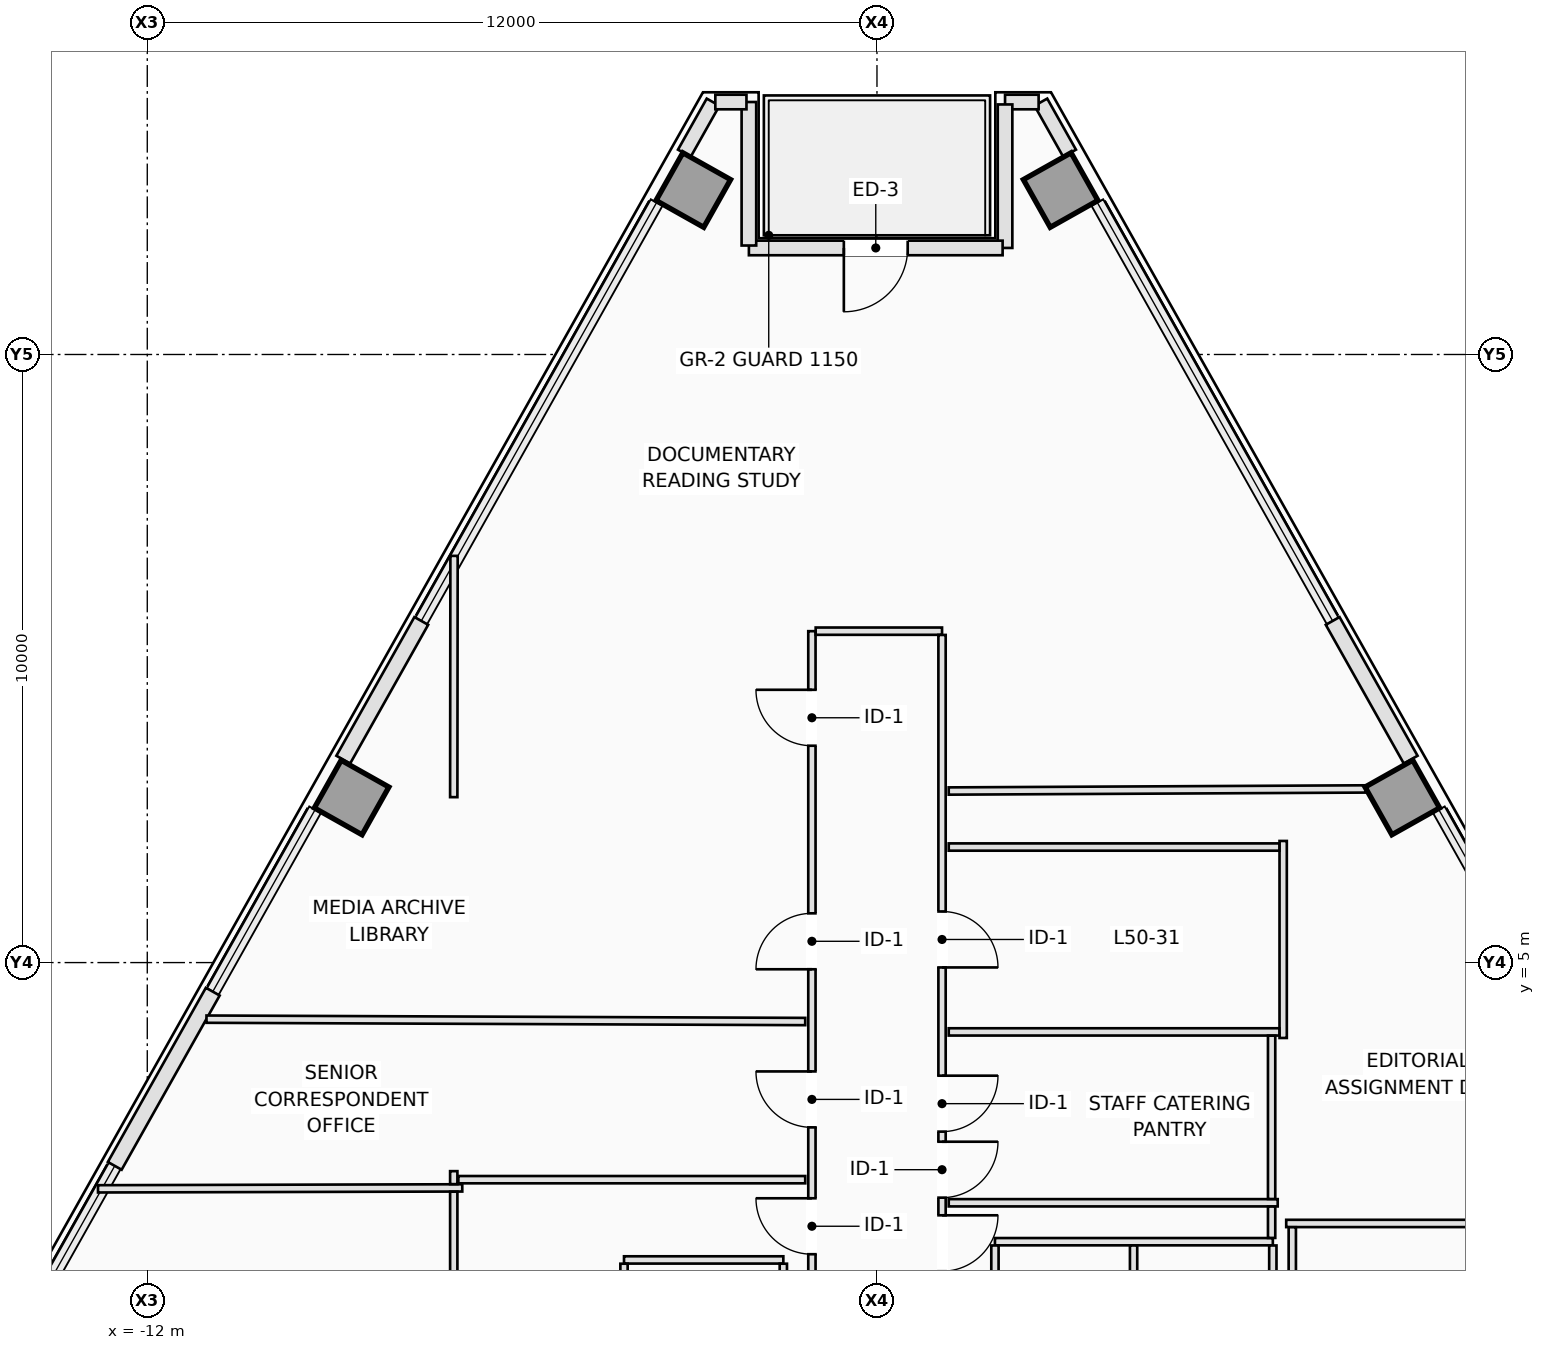
"""IFC4 building model, lengths in metres.
Left out: names, types, materials, properties, quantities, classifications, styles, units other than length and angle.
Written with IfcOpenShell. Run it as: python <this file> out.ifc"""

import sys

from ifc_helpers import new_model, si_unit, direction, frame, frame_2d, origin, origin_2d, place, context, subcontext, project, spatial, rectangle, extrude, element, fill, save


model = new_model("IFC4")
c1 = context("Model", 3, precision=1e-05, world=origin(), true_north=direction((0.0, 1.0)))
c2 = subcontext(c1, "Body", "Model", "MODEL_VIEW")
j1 = project(units=[si_unit("LENGTHUNIT", "METRE"), si_unit("PLANEANGLEUNIT", "RADIAN")], contexts=[c1])
p1 = place(None, origin())
s1 = spatial("IfcSite", under=j1, at=p1, CompositionType="ELEMENT")
p2 = place(p1, origin())
s2 = spatial("IfcBuilding", under=s1, at=p2, CompositionType="ELEMENT")
p3 = place(p2, frame((0.0, 0.0, 183.4)))
s3 = spatial("IfcBuildingStorey", under=s2, at=p3, CompositionType="ELEMENT", Elevation=183.4)
for number, where, z_axis, x_axis in (
    (1, (8.64, 7.715, 0.0), (0.0, 0.0, 1.0), (0.872, 0.49, 0.0)),
    (2, (3.021, 17.704, 0.0), (0.0, 0.0, 1.0), (0.872, 0.49, 0.0)),
    (3, (-3.021, 17.704, 0.0), (0.0, 0.0, 1.0), (-0.872, 0.49, 0.0)),
    (4, (-8.64, 7.715, 0.0), (0.0, 0.0, 1.0), (-0.872, 0.49, 0.0)),
):
    element("IfcColumn", number, at=place(p3, frame(where, z_axis=z_axis, x_axis=x_axis)), inside=s3, PredefinedType="COLUMN", context=c2, shape_type="SweptSolid", body=[
        extrude(rectangle(XDim=0.9, YDim=0.9, at=origin_2d()), origin(), (0.0, 0.0, 1.0), 3.5),
    ])
p4 = place(p3, frame((2.695, 19.149, 0.0), z_axis=(0.0, 0.0, 1.0), x_axis=(0.490345412687, -0.87152818443, 0.0)))
e5 = element("IfcWall", 5, at=p4, inside=s3, PredefinedType="STANDARD", context=c2, shape_type="SweptSolid", body=[
    extrude(rectangle(XDim=0.964, YDim=0.24, at=frame_2d((0.482, 0.0))), origin(), (0.0, 0.0, 1.0), 3.25),
])
p5 = place(p3, frame((7.494, 10.618, 0.0), z_axis=(0.0, 0.0, 1.0), x_axis=(0.490301099378, -0.871553114818, 0.0)))
e6 = element("IfcWall", 6, at=p5, inside=s3, PredefinedType="STANDARD", context=c2, shape_type="SweptSolid", body=[
    extrude(rectangle(XDim=2.617, YDim=0.26, at=frame_2d((1.309, 0.0))), origin(), (0.0, 0.0, 1.0), 3.25),
])
p6 = place(p3, frame((-3.168, 18.309, 0.0), z_axis=(0.0, 0.0, 1.0), x_axis=(0.490345412687, 0.87152818443, 0.0)))
e7 = element("IfcWall", 7, at=p6, inside=s3, PredefinedType="STANDARD", context=c2, shape_type="SweptSolid", body=[
    extrude(rectangle(XDim=0.964, YDim=0.24, at=frame_2d((0.482, 0.0))), origin(), (0.0, 0.0, 1.0), 3.25),
])
p7 = place(p3, frame((-8.777, 8.337, 0.0), z_axis=(0.0, 0.0, 1.0), x_axis=(0.490301099378, 0.871553114818, 0.0)))
e8 = element("IfcWall", 8, at=p7, inside=s3, PredefinedType="STANDARD", context=c2, shape_type="SweptSolid", body=[
    extrude(rectangle(XDim=2.617, YDim=0.26, at=frame_2d((1.309, 0.0))), origin(), (0.0, 0.0, 1.0), 3.25),
])
p8 = place(p3, frame((-12.535, 1.657, 0.0), z_axis=(0.0, 0.0, 1.0), x_axis=(0.490264765862, 0.871573553611, 0.0)))
e9 = element("IfcWall", 9, at=p8, inside=s3, PredefinedType="STANDARD", context=c2, shape_type="SweptSolid", body=[
    extrude(rectangle(XDim=3.287, YDim=0.26, at=frame_2d((1.644, 0.0))), origin(), (0.0, 0.0, 1.0), 3.25),
])
p9 = place(p3, frame((2.658, 19.152, 0.0), z_axis=(0.0, 0.0, 1.0), x_axis=(-1.0, 0.0, 0.0)))
e10 = element("IfcWall", 10, at=p9, inside=s3, PredefinedType="STANDARD", context=c2, shape_type="SweptSolid", body=[
    extrude(rectangle(XDim=0.552, YDim=0.24, at=frame_2d((0.276, 0.0))), origin(), (0.0, 0.0, 1.0), 3.25),
])
p10 = place(p3, frame((2.106, 19.112, 0.0), z_axis=(0.0, 0.0, 1.0), x_axis=(0.0, -1.0, 0.0)))
e11 = element("IfcWall", 11, at=p10, inside=s3, PredefinedType="STANDARD", context=c2, shape_type="SweptSolid", body=[
    extrude(rectangle(XDim=2.36, YDim=0.24, at=frame_2d((1.18, 0.0))), origin(), (0.0, 0.0, 1.0), 3.25),
])
p11 = place(p3, frame((2.066, 16.752, 0.0), z_axis=(0.0, 0.0, 1.0), x_axis=(-1.0, 0.0, 0.0)))
e12 = element("IfcWall", 12, at=p11, inside=s3, PredefinedType="STANDARD", context=c2, shape_type="SweptSolid", body=[
    extrude(rectangle(XDim=4.172, YDim=0.24, at=frame_2d((2.086, 0.0))), origin(), (0.0, 0.0, 1.0), 3.25),
])
p12 = place(p11, frame((1.561, 0.0, 0.0)))
e13 = element("IfcOpeningElement", 13, at=p12, cuts=e12, PredefinedType="OPENING", context=c2, shape_type="SweptSolid", body=[
    extrude(rectangle(XDim=1.05, YDim=2.2, at=frame_2d((0.525, 1.1))), frame((0.0, 0.13, 0.0), z_axis=(0.0, -1.0, 0.0), x_axis=(1.0, 0.0, 0.0)), (0.0, 0.0, 1.0), 0.26),
])
p13 = place(p3, frame((-2.106, 16.792, 0.0), z_axis=(0.0, 0.0, 1.0), x_axis=(0.0, 1.0, 0.0)))
e14 = element("IfcWall", 14, at=p13, inside=s3, PredefinedType="STANDARD", context=c2, shape_type="SweptSolid", body=[
    extrude(rectangle(XDim=2.36, YDim=0.24, at=frame_2d((1.18, 0.0))), origin(), (0.0, 0.0, 1.0), 3.25),
])
p14 = place(p3, frame((-2.146, 19.152, 0.0), z_axis=(0.0, 0.0, 1.0), x_axis=(-1.0, 0.0, 0.0)))
e15 = element("IfcWall", 15, at=p14, inside=s3, PredefinedType="STANDARD", context=c2, shape_type="SweptSolid", body=[
    extrude(rectangle(XDim=0.512, YDim=0.24, at=frame_2d((0.256, 0.0))), origin(), (0.0, 0.0, 1.0), 3.25),
])
p15 = place(p3, frame((-4.16, 0.11, 0.0), z_axis=(0.0, 0.0, 1.0), x_axis=(1.0, 0.0, 0.0)))
e16 = element("IfcWall", 16, at=p15, inside=s3, PredefinedType="PARTITIONING", context=c2, shape_type="SweptSolid", body=[
    extrude(rectangle(XDim=2.62, YDim=0.12, at=frame_2d((1.31, 0.0))), origin(), (0.0, 0.0, 1.0), 3.25),
])
for number, where, z_axis, x_axis in (
    (17, (-4.16, -2.378, 0.0), (0.0, 0.0, 1.0), (0.0, 1.0, 0.0)),
    (18, (-1.54, -2.378, 0.0), (0.0, 0.0, 1.0), (0.0, 1.0, 0.0)),
):
    element("IfcWall", number, at=place(p3, frame(where, z_axis=z_axis, x_axis=x_axis)), inside=s3, PredefinedType="PARTITIONING", context=c2, shape_type="SweptSolid", body=[
        extrude(rectangle(XDim=2.426, YDim=0.12, at=frame_2d((1.213, 0.0))), origin(), (0.0, 0.0, 1.0), 3.25),
    ])
p16 = place(p3, frame((1.94, 0.41, 0.0), z_axis=(0.0, 0.0, 1.0), x_axis=(1.0, 0.0, 0.0)))
e19 = element("IfcWall", 19, at=p16, inside=s3, PredefinedType="PARTITIONING", context=c2, shape_type="SweptSolid", body=[
    extrude(rectangle(XDim=4.57, YDim=0.12, at=frame_2d((2.285, 0.0))), origin(), (0.0, 0.0, 1.0), 3.25),
])
for number, where, z_axis, x_axis in (
    (20, (1.94, -2.378, 0.0), (0.0, 0.0, 1.0), (0.0, 1.0, 0.0)),
    (21, (4.22, -2.378, 0.0), (0.0, 0.0, 1.0), (0.0, 1.0, 0.0)),
    (22, (6.51, -2.378, 0.0), (0.0, 0.0, 1.0), (0.0, 1.0, 0.0)),
):
    element("IfcWall", number, at=place(p3, frame(where, z_axis=z_axis, x_axis=x_axis)), inside=s3, PredefinedType="PARTITIONING", context=c2, shape_type="SweptSolid", body=[
        extrude(rectangle(XDim=2.726, YDim=0.12, at=frame_2d((1.363, 0.0))), origin(), (0.0, 0.0, 1.0), 3.25),
    ])
p17 = place(p3, frame((-1.07, -2.338, 0.0), z_axis=(0.0, 0.0, 1.0), x_axis=(0.0, 1.0, 0.0)))
e23 = element("IfcWall", 23, at=p17, inside=s3, PredefinedType="PARTITIONING", context=c2, shape_type="SweptSolid", body=[
    extrude(rectangle(XDim=12.788, YDim=0.12, at=frame_2d((6.394, 0.0))), origin(), (0.0, 0.0, 1.0), 3.25),
])
p18 = place(p17, frame((10.904, 0.0, 0.0)))
e24 = element("IfcOpeningElement", 24, at=p18, cuts=e23, PredefinedType="OPENING", context=c2, shape_type="SweptSolid", body=[
    extrude(rectangle(XDim=0.92, YDim=2.12, at=frame_2d((0.46, 1.06))), frame((0.0, 0.07, 0.0), z_axis=(0.0, -1.0, 0.0), x_axis=(1.0, 0.0, 0.0)), (0.0, 0.0, 1.0), 0.14),
])
p19 = place(p17, frame((7.228, 0.0, 0.0)))
e25 = element("IfcOpeningElement", 25, at=p19, cuts=e23, PredefinedType="OPENING", context=c2, shape_type="SweptSolid", body=[
    extrude(rectangle(XDim=0.92, YDim=2.12, at=frame_2d((0.46, 1.06))), frame((0.0, 0.07, 0.0), z_axis=(0.0, -1.0, 0.0), x_axis=(1.0, 0.0, 0.0)), (0.0, 0.0, 1.0), 0.14),
])
p20 = place(p17, frame((4.628, 0.0, 0.0)))
e26 = element("IfcOpeningElement", 26, at=p20, cuts=e23, PredefinedType="OPENING", context=c2, shape_type="SweptSolid", body=[
    extrude(rectangle(XDim=0.92, YDim=2.12, at=frame_2d((0.46, 1.06))), frame((0.0, 0.07, 0.0), z_axis=(0.0, -1.0, 0.0), x_axis=(1.0, 0.0, 0.0)), (0.0, 0.0, 1.0), 0.14),
])
p21 = place(p17, frame((2.542, 0.0, 0.0)))
e27 = element("IfcOpeningElement", 27, at=p21, cuts=e23, PredefinedType="OPENING", context=c2, shape_type="SweptSolid", body=[
    extrude(rectangle(XDim=0.92, YDim=2.12, at=frame_2d((0.46, 1.06))), frame((0.0, 0.07, 0.0), z_axis=(0.0, -1.0, 0.0), x_axis=(1.0, 0.0, 0.0)), (0.0, 0.0, 1.0), 0.14),
])
p22 = place(p3, frame((-1.008, 10.45, 0.0), z_axis=(0.0, 0.0, 1.0), x_axis=(1.0, 0.0, 0.0)))
e28 = element("IfcWall", 28, at=p22, inside=s3, PredefinedType="PARTITIONING", context=c2, shape_type="SweptSolid", body=[
    extrude(rectangle(XDim=2.078, YDim=0.12, at=frame_2d((1.039, 0.0))), origin(), (0.0, 0.0, 1.0), 3.25),
])
p23 = place(p3, frame((1.07, 10.388, 0.0), z_axis=(0.0, 0.0, 1.0), x_axis=(0.0, -1.0, 0.0)))
e29 = element("IfcWall", 29, at=p23, inside=s3, PredefinedType="PARTITIONING", context=c2, shape_type="SweptSolid", body=[
    extrude(rectangle(XDim=12.788, YDim=0.12, at=frame_2d((6.394, 0.0))), origin(), (0.0, 0.0, 1.0), 3.25),
])
p24 = place(p23, frame((4.548, 0.0, 0.0)))
e30 = element("IfcOpeningElement", 30, at=p24, cuts=e29, PredefinedType="OPENING", context=c2, shape_type="SweptSolid", body=[
    extrude(rectangle(XDim=0.92, YDim=2.12, at=frame_2d((0.46, 1.06))), frame((0.0, 0.07, 0.0), z_axis=(0.0, -1.0, 0.0), x_axis=(1.0, 0.0, 0.0)), (0.0, 0.0, 1.0), 0.14),
])
p25 = place(p23, frame((8.334, 0.0, 0.0)))
e31 = element("IfcOpeningElement", 31, at=p25, cuts=e29, PredefinedType="OPENING", context=c2, shape_type="SweptSolid", body=[
    extrude(rectangle(XDim=0.92, YDim=2.12, at=frame_2d((0.46, 1.06))), frame((0.0, 0.07, 0.0), z_axis=(0.0, -1.0, 0.0), x_axis=(1.0, 0.0, 0.0)), (0.0, 0.0, 1.0), 0.14),
])
p26 = place(p23, frame((7.248, 0.0, 0.0)))
e32 = element("IfcOpeningElement", 32, at=p26, cuts=e29, PredefinedType="OPENING", context=c2, shape_type="SweptSolid", body=[
    extrude(rectangle(XDim=0.92, YDim=2.12, at=frame_2d((0.46, 1.06))), frame((0.0, 0.07, 0.0), z_axis=(0.0, -1.0, 0.0), x_axis=(1.0, 0.0, 0.0)), (0.0, 0.0, 1.0), 0.14),
])
p27 = place(p23, frame((9.544, 0.0, 0.0)))
e33 = element("IfcOpeningElement", 33, at=p27, cuts=e29, PredefinedType="OPENING", context=c2, shape_type="SweptSolid", body=[
    extrude(rectangle(XDim=0.92, YDim=2.12, at=frame_2d((0.46, 1.06))), frame((0.0, 0.07, 0.0), z_axis=(0.0, -1.0, 0.0), x_axis=(1.0, 0.0, 0.0)), (0.0, 0.0, 1.0), 0.14),
])
p28 = place(p3, frame((-6.96, 7.72, 0.0), z_axis=(0.0, 0.0, 1.0), x_axis=(0.001230616838, 0.999999242791, 0.0)))
e34 = element("IfcWall", 34, at=p28, inside=s3, PredefinedType="PARTITIONING", context=c2, shape_type="SweptSolid", body=[
    extrude(rectangle(XDim=3.968, YDim=0.12, at=frame_2d((1.984, 0.0))), origin(), (0.0, 0.0, 1.0), 3.25),
])
p29 = place(p3, frame((8.042, 7.856, 0.0), z_axis=(0.0, 0.0, 1.0), x_axis=(-0.999987417381, -0.0050164808, 0.0)))
e35 = element("IfcWall", 35, at=p29, inside=s3, PredefinedType="PARTITIONING", context=c2, shape_type="SweptSolid", body=[
    extrude(rectangle(XDim=6.862, YDim=0.12, at=frame_2d((3.431, 0.0))), origin(), (0.0, 0.0, 1.0), 3.25),
])
p30 = place(p3, frame((-1.18, 4.031, 0.0), z_axis=(0.0, 0.0, 1.0), x_axis=(-0.999992130867, 0.003967140436, 0.0)))
e36 = element("IfcWall", 36, at=p30, inside=s3, PredefinedType="PARTITIONING", context=c2, shape_type="SweptSolid", body=[
    extrude(rectangle(XDim=9.846, YDim=0.12, at=frame_2d((4.923, 0.0))), origin(), (0.0, 0.0, 1.0), 3.25),
])
p31 = place(p3, frame((6.68, 7.0, 0.0), z_axis=(0.0, 0.0, 1.0), x_axis=(0.0, -1.0, 0.0)))
e37 = element("IfcWall", 37, at=p31, inside=s3, PredefinedType="PARTITIONING", context=c2, shape_type="SweptSolid", body=[
    extrude(rectangle(XDim=3.24, YDim=0.12, at=frame_2d((1.62, 0.0))), origin(), (0.0, 0.0, 1.0), 3.25),
])
p32 = place(p3, frame((1.18, 6.9, 0.0), z_axis=(0.0, 0.0, 1.0), x_axis=(1.0, 0.0, 0.0)))
e38 = element("IfcWall", 38, at=p32, inside=s3, PredefinedType="PARTITIONING", context=c2, shape_type="SweptSolid", body=[
    extrude(rectangle(XDim=5.438, YDim=0.12, at=frame_2d((2.719, 0.0))), origin(), (0.0, 0.0, 1.0), 3.25),
])
p33 = place(p3, frame((6.618, 3.86, 0.0), z_axis=(0.0, 0.0, 1.0), x_axis=(-1.0, 0.0, 0.0)))
e39 = element("IfcWall", 39, at=p33, inside=s3, PredefinedType="PARTITIONING", context=c2, shape_type="SweptSolid", body=[
    extrude(rectangle(XDim=5.438, YDim=0.12, at=frame_2d((2.719, 0.0))), origin(), (0.0, 0.0, 1.0), 2.943),
])
p34 = place(p3, frame((1.18, 1.05, 0.0), z_axis=(0.0, 0.0, 1.0), x_axis=(1.0, 0.0, 0.0)))
e40 = element("IfcWall", 40, at=p34, inside=s3, PredefinedType="PARTITIONING", context=c2, shape_type="SweptSolid", body=[
    extrude(rectangle(XDim=5.41, YDim=0.12, at=frame_2d((2.705, 0.0))), origin(), (0.0, 0.0, 1.0), 3.25),
])
p35 = place(p3, frame((6.49, 0.472, 0.0), z_axis=(0.0, 0.0, 1.0), x_axis=(0.0, 1.0, 0.0)))
e41 = element("IfcWall", 41, at=p35, inside=s3, PredefinedType="PARTITIONING", context=c2, shape_type="SweptSolid", body=[
    extrude(rectangle(XDim=0.516, YDim=0.12, at=frame_2d((0.258, 0.0))), origin(), (0.0, 0.0, 1.0), 3.25),
])
p36 = place(p3, frame((6.49, 1.112, 0.0), z_axis=(0.0, 0.0, 1.0), x_axis=(0.0, 1.0, 0.0)))
e42 = element("IfcWall", 42, at=p36, inside=s3, PredefinedType="PARTITIONING", context=c2, shape_type="SweptSolid", body=[
    extrude(rectangle(XDim=2.686, YDim=0.12, at=frame_2d((1.343, 0.0))), origin(), (0.0, 0.0, 1.0), 3.25),
])
p37 = place(p3, frame((13.131, 0.71, 0.0), z_axis=(0.0, 0.0, 1.0), x_axis=(-1.0, 0.0, 0.0)))
e43 = element("IfcWall", 43, at=p37, inside=s3, PredefinedType="PARTITIONING", context=c2, shape_type="SweptSolid", body=[
    extrude(rectangle(XDim=6.401, YDim=0.12, at=frame_2d((3.2, 0.0))), origin(), (0.0, 0.0, 1.0), 3.25),
])
p38 = place(p3, frame((6.83, 0.648, 0.0), z_axis=(0.0, 0.0, 1.0), x_axis=(0.0, -1.0, 0.0)))
e44 = element("IfcWall", 44, at=p38, inside=s3, PredefinedType="PARTITIONING", context=c2, shape_type="SweptSolid", body=[
    extrude(rectangle(XDim=2.938, YDim=0.12, at=frame_2d((1.469, 0.0))), origin(), (0.0, 0.0, 1.0), 3.25),
])
p39 = place(p3, frame((-1.18, 1.43, 0.0), z_axis=(0.0, 0.0, 1.0), x_axis=(-1.0, 0.0, 0.0)))
e45 = element("IfcWall", 45, at=p39, inside=s3, PredefinedType="PARTITIONING", context=c2, shape_type="SweptSolid", body=[
    extrude(rectangle(XDim=5.705, YDim=0.12, at=frame_2d((2.852, 0.0))), origin(), (0.0, 0.0, 1.0), 2.943),
])
p40 = place(p3, frame((-6.82, 1.295, 0.0), z_axis=(0.0, 0.0, 1.0), x_axis=(-0.99999659811, -0.002608403256, 0.0)))
e46 = element("IfcWall", 46, at=p40, inside=s3, PredefinedType="PARTITIONING", context=c2, shape_type="SweptSolid", body=[
    extrude(rectangle(XDim=5.99, YDim=0.12, at=frame_2d((2.995, 0.0))), origin(), (0.0, 0.0, 1.0), 3.25),
])
p41 = place(p3, frame((-6.96, -2.29, 0.0), z_axis=(0.0, 0.0, 1.0), x_axis=(0.0, 1.0, 0.0)))
e47 = element("IfcWall", 47, at=p41, inside=s3, PredefinedType="PARTITIONING", context=c2, shape_type="SweptSolid", body=[
    extrude(rectangle(XDim=3.522, YDim=0.12, at=frame_2d((1.761, 0.0))), origin(), (0.0, 0.0, 1.0), 3.25),
])
p42 = place(p3, frame((-6.96, 1.356, 0.0), z_axis=(0.0, 0.0, 1.0), x_axis=(0.0, 1.0, 0.0)))
e48 = element("IfcWall", 48, at=p42, inside=s3, PredefinedType="PARTITIONING", context=c2, shape_type="SweptSolid", body=[
    extrude(rectangle(XDim=0.214, YDim=0.12, at=frame_2d((0.107, 0.0))), origin(), (0.0, 0.0, 1.0), 3.25),
])
p43 = place(p12, origin())
e49 = element("IfcDoor", 49, at=p43, inside=s3, OperationType="SINGLE_SWING_RIGHT", PredefinedType="DOOR", context=c2, shape_type="SweptSolid", body=[
    extrude(rectangle(XDim=1.05, YDim=2.2, at=frame_2d((0.525, 1.1))), frame((0.0, 0.025, 0.0), z_axis=(0.0, -1.0, 0.0), x_axis=(1.0, 0.0, 0.0)), (0.0, 0.0, 1.0), 0.05),
])
fill(e13, e49)
p44 = place(p18, origin())
e50 = element("IfcDoor", 50, at=p44, inside=s3, OperationType="SINGLE_SWING_RIGHT", PredefinedType="DOOR", context=c2, shape_type="SweptSolid", body=[
    extrude(rectangle(XDim=0.92, YDim=2.12, at=frame_2d((0.46, 1.06))), frame((0.0, 0.025, 0.0), z_axis=(0.0, -1.0, 0.0), x_axis=(1.0, 0.0, 0.0)), (0.0, 0.0, 1.0), 0.05),
])
fill(e24, e50)
p45 = place(p19, origin())
e51 = element("IfcDoor", 51, at=p45, inside=s3, OperationType="SINGLE_SWING_LEFT", PredefinedType="DOOR", context=c2, shape_type="SweptSolid", body=[
    extrude(rectangle(XDim=0.92, YDim=2.12, at=frame_2d((0.46, 1.06))), frame((0.0, 0.025, 0.0), z_axis=(0.0, -1.0, 0.0), x_axis=(1.0, 0.0, 0.0)), (0.0, 0.0, 1.0), 0.05),
])
fill(e25, e51)
p46 = place(p24, origin())
e52 = element("IfcDoor", 52, at=p46, inside=s3, OperationType="SINGLE_SWING_RIGHT", PredefinedType="DOOR", context=c2, shape_type="SweptSolid", body=[
    extrude(rectangle(XDim=0.92, YDim=2.12, at=frame_2d((0.46, 1.06))), frame((0.0, 0.025, 0.0), z_axis=(0.0, -1.0, 0.0), x_axis=(1.0, 0.0, 0.0)), (0.0, 0.0, 1.0), 0.05),
])
fill(e30, e52)
p47 = place(p25, origin())
e53 = element("IfcDoor", 53, at=p47, inside=s3, OperationType="SINGLE_SWING_LEFT", PredefinedType="DOOR", context=c2, shape_type="SweptSolid", body=[
    extrude(rectangle(XDim=0.92, YDim=2.12, at=frame_2d((0.46, 1.06))), frame((0.0, 0.025, 0.0), z_axis=(0.0, -1.0, 0.0), x_axis=(1.0, 0.0, 0.0)), (0.0, 0.0, 1.0), 0.05),
])
fill(e31, e53)
p48 = place(p20, origin())
e54 = element("IfcDoor", 54, at=p48, inside=s3, OperationType="SINGLE_SWING_RIGHT", PredefinedType="DOOR", context=c2, shape_type="SweptSolid", body=[
    extrude(rectangle(XDim=0.92, YDim=2.12, at=frame_2d((0.46, 1.06))), frame((0.0, 0.025, 0.0), z_axis=(0.0, -1.0, 0.0), x_axis=(1.0, 0.0, 0.0)), (0.0, 0.0, 1.0), 0.05),
])
fill(e26, e54)
p49 = place(p26, origin())
e55 = element("IfcDoor", 55, at=p49, inside=s3, OperationType="SINGLE_SWING_LEFT", PredefinedType="DOOR", context=c2, shape_type="SweptSolid", body=[
    extrude(rectangle(XDim=0.92, YDim=2.12, at=frame_2d((0.46, 1.06))), frame((0.0, 0.025, 0.0), z_axis=(0.0, -1.0, 0.0), x_axis=(1.0, 0.0, 0.0)), (0.0, 0.0, 1.0), 0.05),
])
fill(e32, e55)
p50 = place(p21, origin())
e56 = element("IfcDoor", 56, at=p50, inside=s3, OperationType="SINGLE_SWING_RIGHT", PredefinedType="DOOR", context=c2, shape_type="SweptSolid", body=[
    extrude(rectangle(XDim=0.92, YDim=2.12, at=frame_2d((0.46, 1.06))), frame((0.0, 0.025, 0.0), z_axis=(0.0, -1.0, 0.0), x_axis=(1.0, 0.0, 0.0)), (0.0, 0.0, 1.0), 0.05),
])
fill(e27, e56)
p51 = place(p27, origin())
e57 = element("IfcDoor", 57, at=p51, inside=s3, OperationType="SINGLE_SWING_LEFT", PredefinedType="DOOR", context=c2, shape_type="SweptSolid", body=[
    extrude(rectangle(XDim=0.92, YDim=2.12, at=frame_2d((0.46, 1.06))), frame((0.0, 0.025, 0.0), z_axis=(0.0, -1.0, 0.0), x_axis=(1.0, 0.0, 0.0)), (0.0, 0.0, 1.0), 0.05),
])
fill(e33, e57)
save(model, sys.argv[1])
